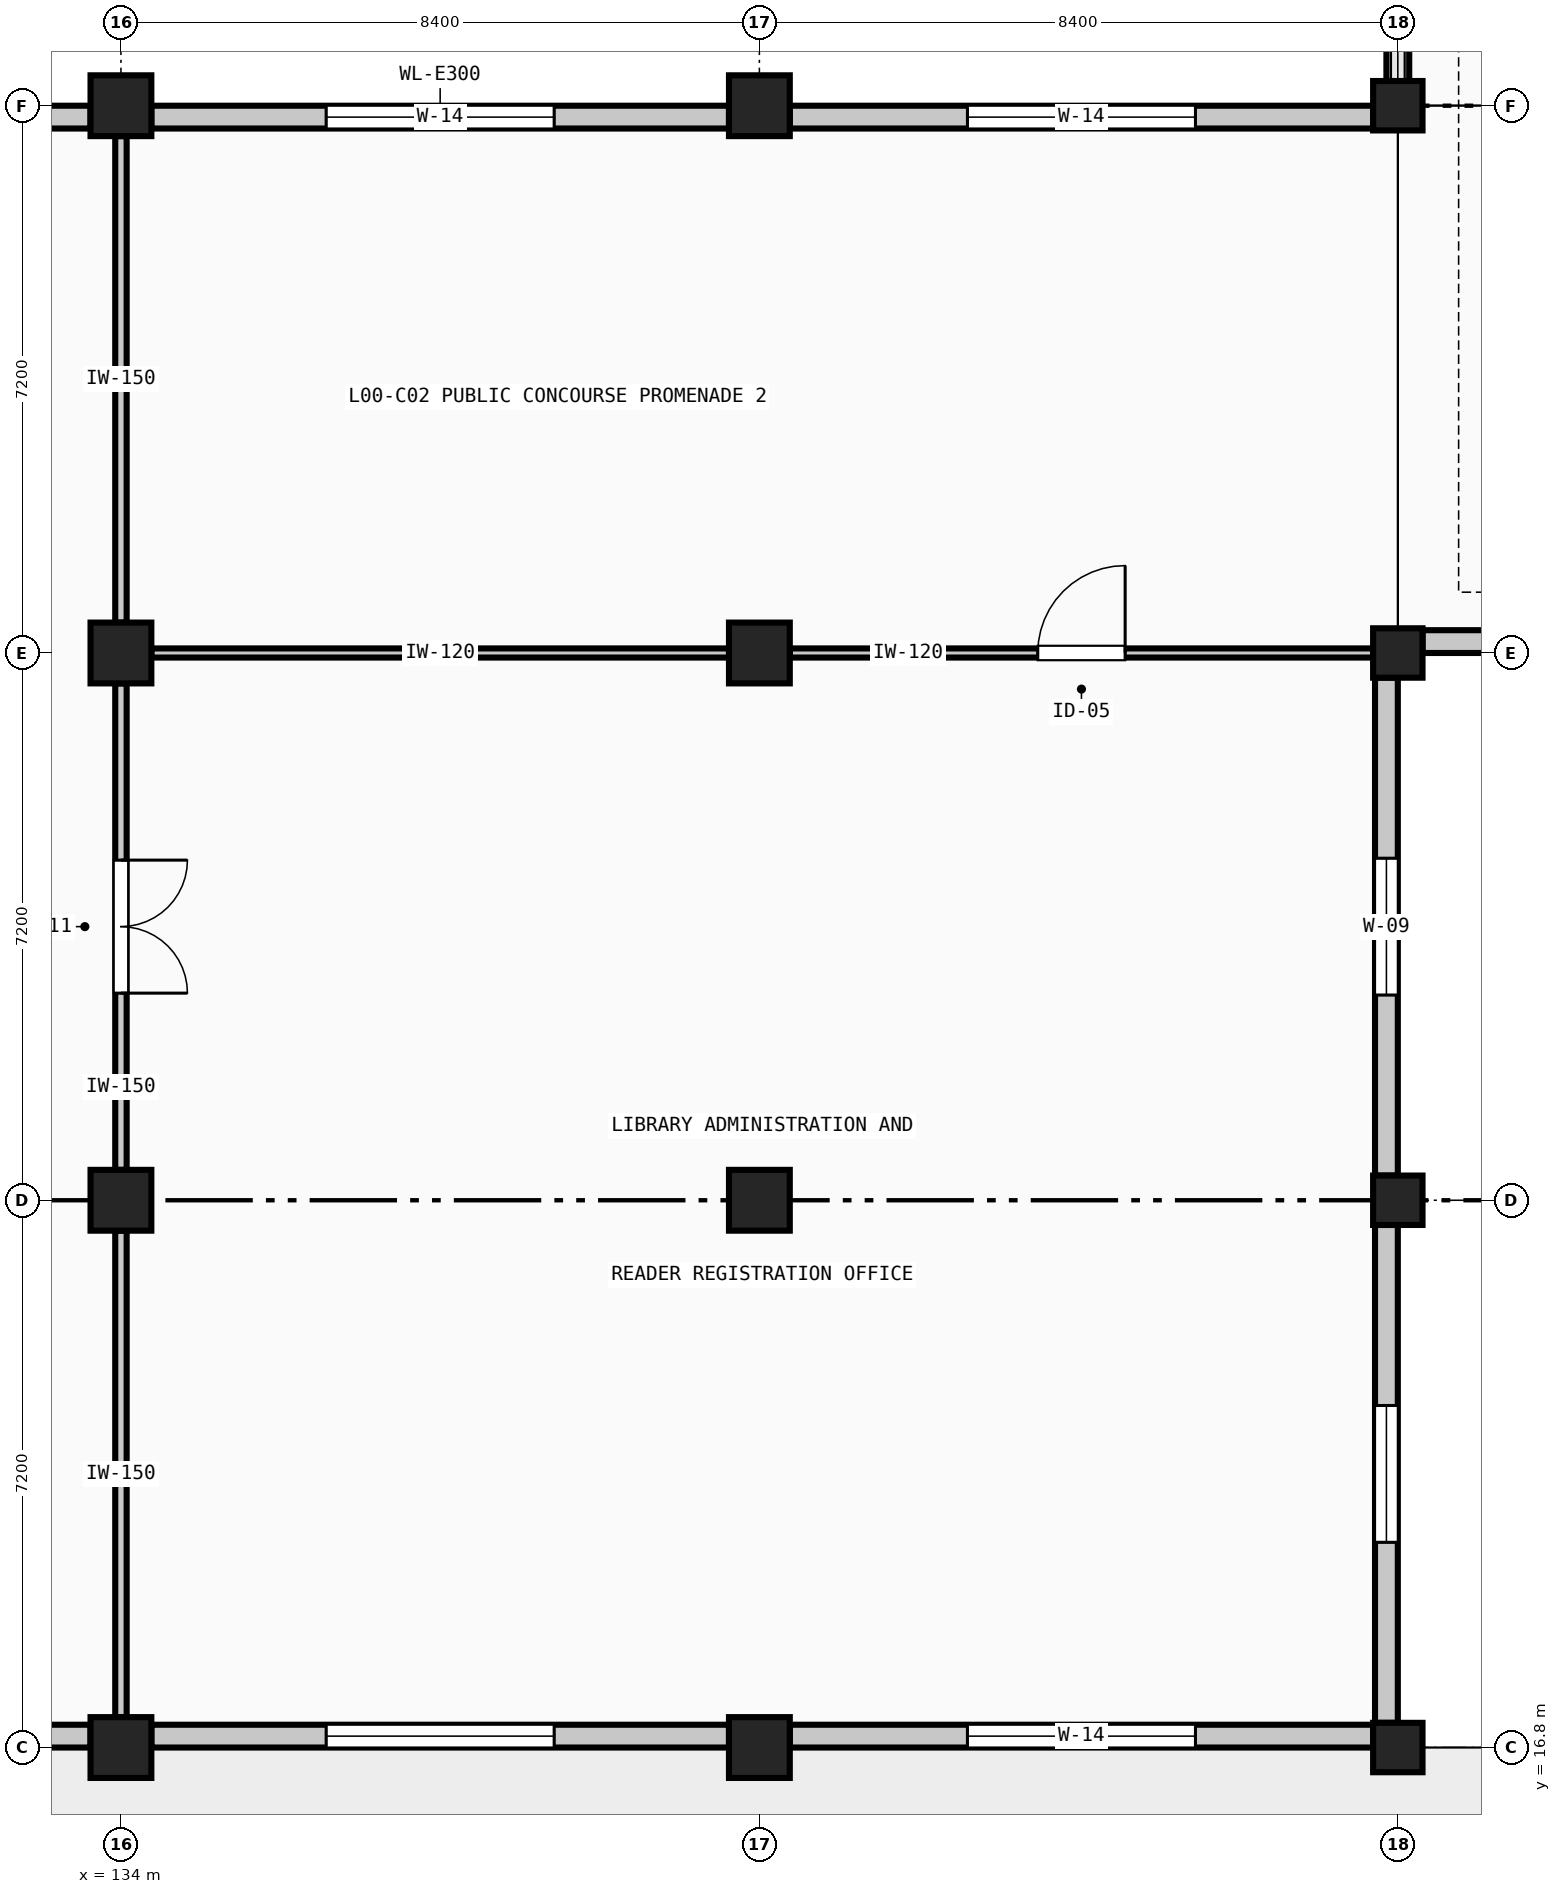
"""IFC4 building model, lengths in metres.
Left out: names, types, materials, properties, quantities, classifications, styles, units other than length and angle.
Written with IfcOpenShell. Run it as: python <this file> out.ifc"""

import sys

from ifc_helpers import new_model, si_unit, direction, frame, frame_2d, origin, origin_2d, place, context, subcontext, project, spatial, rectangle, extrude, element, fill, save


model = new_model("IFC4")
c1 = context("Model", 3, precision=1e-05, world=origin(), true_north=direction((0.0, 1.0)))
c2 = subcontext(c1, "Body", "Model", "MODEL_VIEW")
j1 = project(units=[si_unit("LENGTHUNIT", "METRE"), si_unit("PLANEANGLEUNIT", "RADIAN")], contexts=[c1])
p1 = place(None, origin())
s1 = spatial("IfcSite", under=j1, at=p1, CompositionType="ELEMENT")
p2 = place(p1, origin())
s2 = spatial("IfcBuilding", under=s1, at=p2, CompositionType="ELEMENT")
p3 = place(p2, origin())
s3 = spatial("IfcBuildingStorey", under=s2, at=p3, CompositionType="ELEMENT", Elevation=0.0)
for number, where, z_axis, x_axis in (
    (1, (134.0, 16.8, 0.0), (0.0, 0.0, 1.0), (1.0, 0.0, 0.0)),
    (2, (134.0, 24.0, 0.0), (0.0, 0.0, 1.0), (1.0, 0.0, 0.0)),
    (3, (134.0, 31.2, 0.0), (0.0, 0.0, 1.0), (1.0, 0.0, 0.0)),
    (4, (134.0, 38.4, 0.0), (0.0, 0.0, 1.0), (1.0, 0.0, 0.0)),
    (5, (142.4, 16.8, 0.0), (0.0, 0.0, 1.0), (1.0, 0.0, 0.0)),
    (6, (142.4, 24.0, 0.0), (0.0, 0.0, 1.0), (1.0, 0.0, 0.0)),
    (7, (142.4, 31.2, 0.0), (0.0, 0.0, 1.0), (1.0, 0.0, 0.0)),
    (8, (142.4, 38.4, 0.0), (0.0, 0.0, 1.0), (1.0, 0.0, 0.0)),
):
    element("IfcColumn", number, at=place(p3, frame(where, z_axis=z_axis, x_axis=x_axis)), inside=s3, PredefinedType="COLUMN", context=c2, shape_type="SweptSolid", body=[
        extrude(rectangle(XDim=0.8, YDim=0.8, at=origin_2d()), origin(), (0.0, 0.0, 1.0), 4.8),
    ])
for number, where, z_axis, x_axis in (
    (9, (150.8, 16.8, 0.0), (0.0, 0.0, 1.0), (1.0, 0.0, 0.0)),
    (10, (150.8, 24.0, 0.0), (0.0, 0.0, 1.0), (1.0, 0.0, 0.0)),
    (11, (150.8, 31.2, 0.0), (0.0, 0.0, 1.0), (1.0, 0.0, 0.0)),
    (12, (150.8, 38.4, 0.0), (0.0, 0.0, 1.0), (1.0, 0.0, 0.0)),
):
    element("IfcColumn", number, at=place(p3, frame(where, z_axis=z_axis, x_axis=x_axis)), inside=s3, PredefinedType="COLUMN", context=c2, shape_type="SweptSolid", body=[
        extrude(rectangle(XDim=0.65, YDim=0.65, at=origin_2d()), origin(), (0.0, 0.0, 1.0), 4.8),
    ])
p4 = place(p3, frame((126.0, 38.25, 0.0), z_axis=(0.0, 0.0, 1.0), x_axis=(1.0, 0.0, 0.0)))
e13 = element("IfcWall", 13, at=p4, inside=s3, PredefinedType="SOLIDWALL", context=c2, shape_type="SweptSolid", body=[
    extrude(rectangle(XDim=7.6, YDim=0.3, at=frame_2d((3.8, 0.0))), origin(), (0.0, 0.0, 1.0), 4.1),
])
p5 = place(p4, frame((2.3, 0.0, 0.75)))
e14 = element("IfcOpeningElement", 14, at=p5, cuts=e13, PredefinedType="OPENING", context=c2, shape_type="SweptSolid", body=[
    extrude(rectangle(XDim=3.0, YDim=2.4, at=frame_2d((1.5, 1.2))), frame((0.0, 0.16, 0.0), z_axis=(0.0, -1.0, 0.0), x_axis=(1.0, 0.0, 0.0)), (0.0, 0.0, 1.0), 0.32),
])
p6 = place(p3, frame((134.4, 38.25, 0.0), z_axis=(0.0, 0.0, 1.0), x_axis=(1.0, 0.0, 0.0)))
e15 = element("IfcWall", 15, at=p6, inside=s3, PredefinedType="SOLIDWALL", context=c2, shape_type="SweptSolid", body=[
    extrude(rectangle(XDim=7.6, YDim=0.3, at=frame_2d((3.8, 0.0))), origin(), (0.0, 0.0, 1.0), 4.1),
])
p7 = place(p6, frame((2.3, 0.0, 0.75)))
e16 = element("IfcOpeningElement", 16, at=p7, cuts=e15, PredefinedType="OPENING", context=c2, shape_type="SweptSolid", body=[
    extrude(rectangle(XDim=3.0, YDim=2.4, at=frame_2d((1.5, 1.2))), frame((0.0, 0.16, 0.0), z_axis=(0.0, -1.0, 0.0), x_axis=(1.0, 0.0, 0.0)), (0.0, 0.0, 1.0), 0.32),
])
p8 = place(p3, frame((142.8, 38.25, 0.0), z_axis=(0.0, 0.0, 1.0), x_axis=(1.0, 0.0, 0.0)))
e17 = element("IfcWall", 17, at=p8, inside=s3, PredefinedType="SOLIDWALL", context=c2, shape_type="SweptSolid", body=[
    extrude(rectangle(XDim=7.675, YDim=0.3, at=frame_2d((3.837, 0.0))), origin(), (0.0, 0.0, 1.0), 4.1),
])
p9 = place(p8, frame((2.337, 0.0, 0.75)))
e18 = element("IfcOpeningElement", 18, at=p9, cuts=e17, PredefinedType="OPENING", context=c2, shape_type="SweptSolid", body=[
    extrude(rectangle(XDim=3.0, YDim=2.4, at=frame_2d((1.5, 1.2))), frame((0.0, 0.16, 0.0), z_axis=(0.0, -1.0, 0.0), x_axis=(1.0, 0.0, 0.0)), (0.0, 0.0, 1.0), 0.32),
])
p10 = place(p3, frame((158.875, 31.35, 0.0), z_axis=(0.0, 0.0, 1.0), x_axis=(-1.0, 0.0, 0.0)))
e19 = element("IfcWall", 19, at=p10, inside=s3, PredefinedType="SOLIDWALL", context=c2, shape_type="SweptSolid", body=[
    extrude(rectangle(XDim=7.75, YDim=0.3, at=frame_2d((3.875, 0.0))), origin(), (0.0, 0.0, 1.0), 4.1),
])
p11 = place(p10, frame((2.975, 0.0, 0.75)))
e20 = element("IfcOpeningElement", 20, at=p11, cuts=e19, PredefinedType="OPENING", context=c2, shape_type="SweptSolid", body=[
    extrude(rectangle(XDim=1.8, YDim=2.1, at=frame_2d((0.9, 1.05))), frame((0.0, 0.16, 0.0), z_axis=(0.0, -1.0, 0.0), x_axis=(1.0, 0.0, 0.0)), (0.0, 0.0, 1.0), 0.32),
])
p12 = place(p3, frame((150.65, 30.875, 0.0), z_axis=(0.0, 0.0, 1.0), x_axis=(0.0, -1.0, 0.0)))
e21 = element("IfcWall", 21, at=p12, inside=s3, PredefinedType="SOLIDWALL", context=c2, shape_type="SweptSolid", body=[
    extrude(rectangle(XDim=6.55, YDim=0.3, at=frame_2d((3.275, 0.0))), origin(), (0.0, 0.0, 1.0), 4.2),
])
p13 = place(p12, frame((2.375, 0.0, 0.75)))
e22 = element("IfcOpeningElement", 22, at=p13, cuts=e21, PredefinedType="OPENING", context=c2, shape_type="SweptSolid", body=[
    extrude(rectangle(XDim=1.8, YDim=2.1, at=frame_2d((0.9, 1.05))), frame((0.0, 0.16, 0.0), z_axis=(0.0, -1.0, 0.0), x_axis=(1.0, 0.0, 0.0)), (0.0, 0.0, 1.0), 0.32),
])
p14 = place(p3, frame((150.65, 23.675, 0.0), z_axis=(0.0, 0.0, 1.0), x_axis=(0.0, -1.0, 0.0)))
e23 = element("IfcWall", 23, at=p14, inside=s3, PredefinedType="SOLIDWALL", context=c2, shape_type="SweptSolid", body=[
    extrude(rectangle(XDim=6.55, YDim=0.3, at=frame_2d((3.275, 0.0))), origin(), (0.0, 0.0, 1.0), 4.2),
])
p15 = place(p14, frame((2.375, 0.0, 0.75)))
e24 = element("IfcOpeningElement", 24, at=p15, cuts=e23, PredefinedType="OPENING", context=c2, shape_type="SweptSolid", body=[
    extrude(rectangle(XDim=1.8, YDim=2.1, at=frame_2d((0.9, 1.05))), frame((0.0, 0.16, 0.0), z_axis=(0.0, -1.0, 0.0), x_axis=(1.0, 0.0, 0.0)), (0.0, 0.0, 1.0), 0.32),
])
p16 = place(p3, frame((150.475, 16.95, 0.0), z_axis=(0.0, 0.0, 1.0), x_axis=(-1.0, 0.0, 0.0)))
e25 = element("IfcWall", 25, at=p16, inside=s3, PredefinedType="SOLIDWALL", context=c2, shape_type="SweptSolid", body=[
    extrude(rectangle(XDim=7.675, YDim=0.3, at=frame_2d((3.837, 0.0))), origin(), (0.0, 0.0, 1.0), 4.1),
])
p17 = place(p16, frame((2.337, 0.0, 0.75)))
e26 = element("IfcOpeningElement", 26, at=p17, cuts=e25, PredefinedType="OPENING", context=c2, shape_type="SweptSolid", body=[
    extrude(rectangle(XDim=3.0, YDim=2.4, at=frame_2d((1.5, 1.2))), frame((0.0, 0.16, 0.0), z_axis=(0.0, -1.0, 0.0), x_axis=(1.0, 0.0, 0.0)), (0.0, 0.0, 1.0), 0.32),
])
p18 = place(p3, frame((142.0, 16.95, 0.0), z_axis=(0.0, 0.0, 1.0), x_axis=(-1.0, 0.0, 0.0)))
e27 = element("IfcWall", 27, at=p18, inside=s3, PredefinedType="SOLIDWALL", context=c2, shape_type="SweptSolid", body=[
    extrude(rectangle(XDim=7.6, YDim=0.3, at=frame_2d((3.8, 0.0))), origin(), (0.0, 0.0, 1.0), 4.1),
])
p19 = place(p18, frame((2.3, 0.0, 0.75)))
e28 = element("IfcOpeningElement", 28, at=p19, cuts=e27, PredefinedType="OPENING", context=c2, shape_type="SweptSolid", body=[
    extrude(rectangle(XDim=3.0, YDim=2.4, at=frame_2d((1.5, 1.2))), frame((0.0, 0.16, 0.0), z_axis=(0.0, -1.0, 0.0), x_axis=(1.0, 0.0, 0.0)), (0.0, 0.0, 1.0), 0.32),
])
p20 = place(p3, frame((133.6, 16.95, 0.0), z_axis=(0.0, 0.0, 1.0), x_axis=(-1.0, 0.0, 0.0)))
e29 = element("IfcWall", 29, at=p20, inside=s3, PredefinedType="SOLIDWALL", context=c2, shape_type="SweptSolid", body=[
    extrude(rectangle(XDim=7.6, YDim=0.3, at=frame_2d((3.8, 0.0))), origin(), (0.0, 0.0, 1.0), 4.1),
])
p21 = place(p20, frame((2.8, 0.0, 0.0)))
e30 = element("IfcOpeningElement", 30, at=p21, cuts=e29, PredefinedType="OPENING", context=c2, shape_type="SweptSolid", body=[
    extrude(rectangle(XDim=2.0, YDim=2.4, at=frame_2d((1.0, 1.2))), frame((0.0, 0.16, 0.0), z_axis=(0.0, -1.0, 0.0), x_axis=(1.0, 0.0, 0.0)), (0.0, 0.0, 1.0), 0.32),
])
p22 = place(p3, frame((150.8, 38.4, 0.0), z_axis=(0.0, 0.0, 1.0), x_axis=(0.0, 1.0, 0.0)))
e31 = element("IfcWall", 31, at=p22, inside=s3, PredefinedType="SOLIDWALL", context=c2, shape_type="SweptSolid", body=[
    extrude(rectangle(XDim=4.2, YDim=0.3, at=frame_2d((2.1, 0.0))), origin(), (0.0, 0.0, 1.0), 3.0),
])
p23 = place(p22, frame((0.9, 0.0, 0.0)))
e32 = element("IfcOpeningElement", 32, at=p23, cuts=e31, PredefinedType="OPENING", context=c2, shape_type="SweptSolid", body=[
    extrude(rectangle(XDim=2.4, YDim=2.2, at=frame_2d((1.2, 1.1))), frame((0.0, 0.16, 0.0), z_axis=(0.0, -1.0, 0.0), x_axis=(1.0, 0.0, 0.0)), (0.0, 0.0, 1.0), 0.32),
])
p24 = place(p3, frame((134.0, 38.0, 0.0), z_axis=(0.0, 0.0, 1.0), x_axis=(0.0, -1.0, 0.0)))
e33 = element("IfcWall", 33, at=p24, inside=s3, PredefinedType="PARTITIONING", context=c2, shape_type="SweptSolid", body=[
    extrude(rectangle(XDim=6.4, YDim=0.15, at=frame_2d((3.2, 0.0))), origin(), (0.0, 0.0, 1.0), 4.05),
])
p25 = place(p3, frame((134.0, 30.8, 0.0), z_axis=(0.0, 0.0, 1.0), x_axis=(0.0, -1.0, 0.0)))
e34 = element("IfcWall", 34, at=p25, inside=s3, PredefinedType="PARTITIONING", context=c2, shape_type="SweptSolid", body=[
    extrude(rectangle(XDim=6.4, YDim=0.15, at=frame_2d((3.2, 0.0))), origin(), (0.0, 0.0, 1.0), 4.05),
])
p26 = place(p25, frame((2.325, 0.0, 0.0)))
e35 = element("IfcOpeningElement", 35, at=p26, cuts=e34, PredefinedType="OPENING", context=c2, shape_type="SweptSolid", body=[
    extrude(rectangle(XDim=1.75, YDim=2.3, at=frame_2d((0.875, 1.15))), frame((0.0, 0.085, 0.0), z_axis=(0.0, -1.0, 0.0), x_axis=(1.0, 0.0, 0.0)), (0.0, 0.0, 1.0), 0.17),
])
p27 = place(p3, frame((134.0, 23.6, 0.0), z_axis=(0.0, 0.0, 1.0), x_axis=(0.0, -1.0, 0.0)))
e36 = element("IfcWall", 36, at=p27, inside=s3, PredefinedType="PARTITIONING", context=c2, shape_type="SweptSolid", body=[
    extrude(rectangle(XDim=6.4, YDim=0.15, at=frame_2d((3.2, 0.0))), origin(), (0.0, 0.0, 1.0), 4.05),
])
p28 = place(p3, frame((134.4, 31.2, 0.0), z_axis=(0.0, 0.0, 1.0), x_axis=(1.0, 0.0, 0.0)))
e37 = element("IfcWall", 37, at=p28, inside=s3, PredefinedType="PARTITIONING", context=c2, shape_type="SweptSolid", body=[
    extrude(rectangle(XDim=7.6, YDim=0.12, at=frame_2d((3.8, 0.0))), origin(), (0.0, 0.0, 1.0), 4.0),
])
p29 = place(p3, frame((142.8, 31.2, 0.0), z_axis=(0.0, 0.0, 1.0), x_axis=(1.0, 0.0, 0.0)))
e38 = element("IfcWall", 38, at=p29, inside=s3, PredefinedType="PARTITIONING", context=c2, shape_type="SweptSolid", body=[
    extrude(rectangle(XDim=7.675, YDim=0.12, at=frame_2d((3.837, 0.0))), origin(), (0.0, 0.0, 1.0), 4.0),
])
p30 = place(p29, frame((3.262, 0.0, 0.0)))
e39 = element("IfcOpeningElement", 39, at=p30, cuts=e38, PredefinedType="OPENING", context=c2, shape_type="SweptSolid", body=[
    extrude(rectangle(XDim=1.15, YDim=2.2, at=frame_2d((0.575, 1.1))), frame((0.0, 0.07, 0.0), z_axis=(0.0, -1.0, 0.0), x_axis=(1.0, 0.0, 0.0)), (0.0, 0.0, 1.0), 0.14),
])
p31 = place(p7, origin())
e40 = element("IfcWindow", 40, at=p31, inside=s3, PartitioningType="SINGLE_PANEL", PredefinedType="WINDOW", context=c2, shape_type="SweptSolid", body=[
    extrude(rectangle(XDim=3.0, YDim=2.4, at=frame_2d((1.5, 1.2))), frame((0.0, 0.03, 0.0), z_axis=(0.0, -1.0, 0.0), x_axis=(1.0, 0.0, 0.0)), (0.0, 0.0, 1.0), 0.06),
])
fill(e16, e40)
p32 = place(p9, origin())
e41 = element("IfcWindow", 41, at=p32, inside=s3, PartitioningType="SINGLE_PANEL", PredefinedType="WINDOW", context=c2, shape_type="SweptSolid", body=[
    extrude(rectangle(XDim=3.0, YDim=2.4, at=frame_2d((1.5, 1.2))), frame((0.0, 0.03, 0.0), z_axis=(0.0, -1.0, 0.0), x_axis=(1.0, 0.0, 0.0)), (0.0, 0.0, 1.0), 0.06),
])
fill(e18, e41)
p33 = place(p13, origin())
e42 = element("IfcWindow", 42, at=p33, inside=s3, PartitioningType="SINGLE_PANEL", PredefinedType="WINDOW", context=c2, shape_type="SweptSolid", body=[
    extrude(rectangle(XDim=1.8, YDim=2.1, at=frame_2d((0.9, 1.05))), frame((0.0, 0.03, 0.0), z_axis=(0.0, -1.0, 0.0), x_axis=(1.0, 0.0, 0.0)), (0.0, 0.0, 1.0), 0.06),
])
fill(e22, e42)
p34 = place(p15, origin())
e43 = element("IfcWindow", 43, at=p34, inside=s3, PartitioningType="SINGLE_PANEL", PredefinedType="WINDOW", context=c2, shape_type="SweptSolid", body=[
    extrude(rectangle(XDim=1.8, YDim=2.1, at=frame_2d((0.9, 1.05))), frame((0.0, 0.03, 0.0), z_axis=(0.0, -1.0, 0.0), x_axis=(1.0, 0.0, 0.0)), (0.0, 0.0, 1.0), 0.06),
])
fill(e24, e43)
p35 = place(p17, origin())
e44 = element("IfcWindow", 44, at=p35, inside=s3, PartitioningType="SINGLE_PANEL", PredefinedType="WINDOW", context=c2, shape_type="SweptSolid", body=[
    extrude(rectangle(XDim=3.0, YDim=2.4, at=frame_2d((1.5, 1.2))), frame((0.0, 0.03, 0.0), z_axis=(0.0, -1.0, 0.0), x_axis=(1.0, 0.0, 0.0)), (0.0, 0.0, 1.0), 0.06),
])
fill(e26, e44)
p36 = place(p19, origin())
e45 = element("IfcWindow", 45, at=p36, inside=s3, PartitioningType="SINGLE_PANEL", PredefinedType="WINDOW", context=c2, shape_type="SweptSolid", body=[
    extrude(rectangle(XDim=3.0, YDim=2.4, at=frame_2d((1.5, 1.2))), frame((0.0, 0.03, 0.0), z_axis=(0.0, -1.0, 0.0), x_axis=(1.0, 0.0, 0.0)), (0.0, 0.0, 1.0), 0.06),
])
fill(e28, e45)
p37 = place(p26, origin())
e46 = element("IfcDoor", 46, at=p37, inside=s3, OperationType="DOUBLE_DOOR_SINGLE_SWING", PredefinedType="DOOR", context=c2, shape_type="SweptSolid", body=[
    extrude(rectangle(XDim=1.75, YDim=2.3, at=frame_2d((0.875, 1.15))), frame((0.0, 0.025, 0.0), z_axis=(0.0, -1.0, 0.0), x_axis=(1.0, 0.0, 0.0)), (0.0, 0.0, 1.0), 0.05),
])
fill(e35, e46)
p38 = place(p30, origin())
e47 = element("IfcDoor", 47, at=p38, inside=s3, OperationType="SINGLE_SWING_RIGHT", PredefinedType="DOOR", context=c2, shape_type="SweptSolid", body=[
    extrude(rectangle(XDim=1.15, YDim=2.2, at=frame_2d((0.575, 1.1))), frame((0.0, 0.025, 0.0), z_axis=(0.0, -1.0, 0.0), x_axis=(1.0, 0.0, 0.0)), (0.0, 0.0, 1.0), 0.05),
])
fill(e39, e47)
save(model, sys.argv[1])
